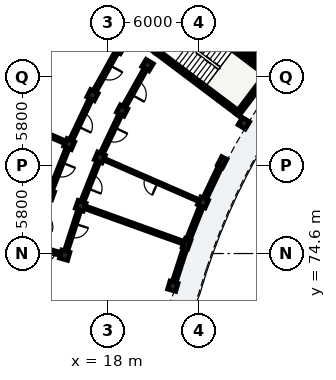
"""IFC4 building model, lengths in metres.
Left out: names, types, materials, properties, quantities, classifications, styles, units other than length and angle.
Written with IfcOpenShell. Run it as: python <this file> out.ifc"""

import sys

from ifc_helpers import new_model, si_unit, direction, frame, frame_2d, origin, origin_2d, place, context, subcontext, project, spatial, rectangle, extrude, element, fill, save


model = new_model("IFC4")
c1 = context("Model", 3, precision=1e-05, world=origin(), true_north=direction((0.0, 1.0)))
c2 = subcontext(c1, "Body", "Model", "MODEL_VIEW")
j1 = project(units=[si_unit("LENGTHUNIT", "METRE"), si_unit("PLANEANGLEUNIT", "RADIAN")], contexts=[c1])
p1 = place(None, origin())
s1 = spatial("IfcSite", under=j1, at=p1, CompositionType="ELEMENT")
p2 = place(p1, origin())
s2 = spatial("IfcBuilding", under=s1, at=p2, CompositionType="ELEMENT")
p3 = place(p2, frame((0.0, 0.0, 22.28)))
s3 = spatial("IfcBuildingStorey", under=s2, at=p3, CompositionType="ELEMENT", Elevation=22.28)
p4 = place(p3, frame((21.199, 87.897, 0.0), z_axis=(0.0, 0.0, 1.0), x_axis=(0.798639633744, -0.601809550782, 0.0)))
e1 = element("IfcWall", 1, at=p4, inside=s3, PredefinedType="SHEAR", context=c2, shape_type="SweptSolid", body=[
    extrude(rectangle(XDim=6.6, YDim=0.28, at=frame_2d((3.3, 0.0))), origin(), (0.0, 0.0, 1.0), 3.11),
])
for number, where, z_axis, x_axis in (
    (2, (26.497, 83.729, 0.0), (0.0, 0.0, 1.0), (0.602, 0.799, 0.0)),
    (3, (21.003, 87.87, 0.0), (0.0, 0.0, 1.0), (0.602, 0.799, 0.0)),
):
    element("IfcWall", number, at=place(p3, frame(where, z_axis=z_axis, x_axis=x_axis)), inside=s3, PredefinedType="SHEAR", context=c2, shape_type="SweptSolid", body=[
        extrude(rectangle(XDim=3.48, YDim=0.28, at=frame_2d((1.74, 0.0))), origin(), (0.0, 0.0, 1.0), 3.11),
    ])
p5 = place(p3, frame((23.125, 90.453, 0.0), z_axis=(0.0, 0.0, 1.0), x_axis=(0.798639633744, -0.601809550782, 0.0)))
e4 = element("IfcWall", 4, at=p5, inside=s3, PredefinedType="SHEAR", context=c2, shape_type="SweptSolid", body=[
    extrude(rectangle(XDim=6.6, YDim=0.28, at=frame_2d((3.3, 0.0))), origin(), (0.0, 0.0, 1.0), 3.11),
])
p6 = place(p5, frame((0.22, 0.0, 0.0)))
e5 = element("IfcOpeningElement", 5, at=p6, cuts=e4, PredefinedType="OPENING", context=c2, shape_type="SweptSolid", body=[
    extrude(rectangle(XDim=1.05, YDim=2.15, at=frame_2d((0.525, 1.075))), frame((0.0, 0.15, 0.0), z_axis=(0.0, -1.0, 0.0), x_axis=(1.0, 0.0, 0.0)), (0.0, 0.0, 1.0), 0.3),
])
p7 = place(p3, frame((26.455, 88.476, 0.0), z_axis=(0.0, 0.0, 1.0), x_axis=(0.798608971494, -0.601850239387, 0.0)))
e6 = element("IfcWall", 6, at=p7, inside=s3, PredefinedType="SHEAR", context=c2, shape_type="SweptSolid", body=[
    extrude(rectangle(XDim=2.7, YDim=0.23, at=frame_2d((1.35, 0.0))), origin(), (0.0, 0.0, 1.0), 3.11),
])
for number, where, z_axis, x_axis in (
    (7, (26.943, 83.167, 0.0), (0.0, 0.0, 1.0), (-0.856, 0.517, 0.0)),
    (8, (20.608, 86.991, 0.0), (0.0, 0.0, 1.0), (-0.856, 0.517, 0.0)),
    (9, (18.724, 88.128, 0.0), (0.0, 0.0, 1.0), (-0.856, 0.517, 0.0)),
):
    element("IfcColumn", number, at=place(p3, frame(where, z_axis=z_axis, x_axis=x_axis)), inside=s3, PredefinedType="COLUMN", context=c2, shape_type="SweptSolid", body=[
        extrude(rectangle(XDim=0.55, YDim=0.55, at=origin_2d()), origin(), (0.0, 0.0, 1.0), 3.11),
    ])
p8 = place(p3, frame((25.513, 80.61, 0.0), z_axis=(0.0, 0.0, 1.0), x_axis=(-0.888350277506, 0.459166401705, 0.0)))
e10 = element("IfcColumn", 10, at=p8, inside=s3, PredefinedType="PILASTER", context=c2, shape_type="SweptSolid", body=[
    extrude(rectangle(XDim=0.38, YDim=0.62, at=origin_2d()), origin(), (0.0, 0.0, 1.0), 3.11),
])
for number, where, z_axis, x_axis in (
    (11, (18.939, 84.008, 0.0), (0.0, 0.0, 1.0), (-0.888, 0.459, 0.0)),
    (12, (16.985, 85.018, 0.0), (0.0, 0.0, 1.0), (-0.888, 0.459, 0.0)),
    (13, (24.254, 77.964, 0.0), (0.0, 0.0, 1.0), (-0.917, 0.4, 0.0)),
    (14, (17.47, 80.921, 0.0), (0.0, 0.0, 1.0), (-0.917, 0.4, 0.0)),
    (15, (15.454, 81.801, 0.0), (0.0, 0.0, 1.0), (-0.917, 0.4, 0.0)),
):
    element("IfcColumn", number, at=place(p3, frame(where, z_axis=z_axis, x_axis=x_axis)), inside=s3, PredefinedType="COLUMN", context=c2, shape_type="SweptSolid", body=[
        extrude(rectangle(XDim=0.55, YDim=0.55, at=origin_2d()), origin(), (0.0, 0.0, 1.0), 3.11),
    ])
p9 = place(p3, frame((23.172, 75.241, 0.0), z_axis=(0.0, 0.0, 1.0), x_axis=(-0.941012100316, 0.338372911236, 0.0)))
e16 = element("IfcColumn", 16, at=p9, inside=s3, PredefinedType="PILASTER", context=c2, shape_type="SweptSolid", body=[
    extrude(rectangle(XDim=0.38, YDim=0.62, at=origin_2d()), origin(), (0.0, 0.0, 1.0), 3.11),
])
for number, where, z_axis, x_axis in (
    (17, (16.208, 77.745, 0.0), (0.0, 0.0, 1.0), (-0.941, 0.338, 0.0)),
    (18, (14.138, 78.489, 0.0), (0.0, 0.0, 1.0), (-0.941, 0.338, 0.0)),
    (19, (22.272, 72.452, 0.0), (0.0, 0.0, 1.0), (-0.961, 0.276, 0.0)),
    (20, (15.159, 74.492, 0.0), (0.0, 0.0, 1.0), (-0.961, 0.276, 0.0)),
):
    element("IfcColumn", number, at=place(p3, frame(where, z_axis=z_axis, x_axis=x_axis)), inside=s3, PredefinedType="COLUMN", context=c2, shape_type="SweptSolid", body=[
        extrude(rectangle(XDim=0.55, YDim=0.55, at=origin_2d()), origin(), (0.0, 0.0, 1.0), 3.11),
    ])
p10 = place(p3, frame((25.444, 80.466, 0.0), z_axis=(0.0, 0.0, 1.0), x_axis=(-0.429610836066, -0.903014135844, 0.0)))
e21 = element("IfcWall", 21, at=p10, inside=s3, PredefinedType="SOLIDWALL", context=c2, shape_type="SweptSolid", body=[
    extrude(rectangle(XDim=2.525, YDim=0.245, at=frame_2d((1.263, 0.0))), origin(), (0.0, 0.0, 1.0), 2.355),
])
p11 = place(p10, frame((0.643, 0.0, 0.55)))
e22 = element("IfcOpeningElement", 22, at=p11, cuts=e21, PredefinedType="OPENING", context=c2, shape_type="SweptSolid", body=[
    extrude(rectangle(XDim=1.24, YDim=1.535, at=frame_2d((0.62, 0.768))), frame((0.0, 0.133, 0.0), z_axis=(0.0, -1.0, 0.0), x_axis=(1.0, 0.0, 0.0)), (0.0, 0.0, 1.0), 0.265),
])
p12 = place(p3, frame((24.163, 77.736, 0.0), z_axis=(0.0, 0.0, 1.0), x_axis=(-0.369122600107, -0.92938071106, 0.0)))
e23 = element("IfcWall", 23, at=p12, inside=s3, PredefinedType="SOLIDWALL", context=c2, shape_type="SweptSolid", body=[
    extrude(rectangle(XDim=2.525, YDim=0.245, at=frame_2d((1.263, 0.0))), origin(), (0.0, 0.0, 1.0), 2.355),
])
p13 = place(p12, frame((0.583, 0.0, 0.55)))
e24 = element("IfcOpeningElement", 24, at=p13, cuts=e23, PredefinedType="OPENING", context=c2, shape_type="SweptSolid", body=[
    extrude(rectangle(XDim=1.36, YDim=1.61, at=frame_2d((0.68, 0.805))), frame((0.0, 0.133, 0.0), z_axis=(0.0, -1.0, 0.0), x_axis=(1.0, 0.0, 0.0)), (0.0, 0.0, 1.0), 0.265),
])
p14 = place(p3, frame((23.123, 75.088, 0.0), z_axis=(0.0, 0.0, 1.0), x_axis=(-0.30716379336, -0.951656662903, 0.0)))
e25 = element("IfcWall", 25, at=p14, inside=s3, PredefinedType="SOLIDWALL", context=c2, shape_type="SweptSolid", body=[
    extrude(rectangle(XDim=2.525, YDim=0.245, at=frame_2d((1.263, 0.0))), origin(), (0.0, 0.0, 1.0), 2.355),
])
p15 = place(p14, frame((0.523, 0.0, 0.55)))
e26 = element("IfcOpeningElement", 26, at=p15, cuts=e25, PredefinedType="OPENING", context=c2, shape_type="SweptSolid", body=[
    extrude(rectangle(XDim=1.48, YDim=1.46, at=frame_2d((0.74, 0.73))), frame((0.0, 0.133, 0.0), z_axis=(0.0, -1.0, 0.0), x_axis=(1.0, 0.0, 0.0)), (0.0, 0.0, 1.0), 0.265),
])
p16 = place(p3, frame((18.553, 87.822, 0.0), z_axis=(0.0, 0.0, 1.0), x_axis=(-0.488211211273, -0.872725508501, 0.0)))
e27 = element("IfcWall", 27, at=p16, inside=s3, PredefinedType="PARTITIONING", context=c2, shape_type="SweptSolid", body=[
    extrude(rectangle(XDim=2.863, YDim=0.205, at=frame_2d((1.431, 0.0))), origin(), (0.0, 0.0, 1.0), 2.37),
])
p17 = place(p16, frame((0.937, 0.0, 0.0)))
e28 = element("IfcOpeningElement", 28, at=p17, cuts=e27, PredefinedType="OPENING", context=c2, shape_type="SweptSolid", body=[
    extrude(rectangle(XDim=0.99, YDim=2.16, at=frame_2d((0.495, 1.08))), frame((0.0, 0.113, 0.0), z_axis=(0.0, -1.0, 0.0), x_axis=(1.0, 0.0, 0.0)), (0.0, 0.0, 1.0), 0.225),
])
p18 = place(p3, frame((20.437, 86.685, 0.0), z_axis=(0.0, 0.0, 1.0), x_axis=(-0.48819576874, -0.872734147025, 0.0)))
e29 = element("IfcWall", 29, at=p18, inside=s3, PredefinedType="PARTITIONING", context=c2, shape_type="SweptSolid", body=[
    extrude(rectangle(XDim=2.718, YDim=0.205, at=frame_2d((1.359, 0.0))), origin(), (0.0, 0.0, 1.0), 2.37),
])
p19 = place(p18, frame((0.864, 0.0, 0.0)))
e30 = element("IfcOpeningElement", 30, at=p19, cuts=e29, PredefinedType="OPENING", context=c2, shape_type="SweptSolid", body=[
    extrude(rectangle(XDim=0.99, YDim=2.16, at=frame_2d((0.495, 1.08))), frame((0.0, 0.113, 0.0), z_axis=(0.0, -1.0, 0.0), x_axis=(1.0, 0.0, 0.0)), (0.0, 0.0, 1.0), 0.225),
])
p20 = place(p3, frame((16.834, 84.702, 0.0), z_axis=(0.0, 0.0, 1.0), x_axis=(-0.429595933416, -0.90302122566, 0.0)))
e31 = element("IfcWall", 31, at=p20, inside=s3, PredefinedType="PARTITIONING", context=c2, shape_type="SweptSolid", body=[
    extrude(rectangle(XDim=2.863, YDim=0.205, at=frame_2d((1.432, 0.0))), origin(), (0.0, 0.0, 1.0), 2.37),
])
p21 = place(p20, frame((0.947, 0.0, 0.0)))
e32 = element("IfcOpeningElement", 32, at=p21, cuts=e31, PredefinedType="OPENING", context=c2, shape_type="SweptSolid", body=[
    extrude(rectangle(XDim=0.97, YDim=2.15, at=frame_2d((0.485, 1.075))), frame((0.0, 0.113, 0.0), z_axis=(0.0, -1.0, 0.0), x_axis=(1.0, 0.0, 0.0)), (0.0, 0.0, 1.0), 0.225),
])
p22 = place(p3, frame((18.789, 83.692, 0.0), z_axis=(0.0, 0.0, 1.0), x_axis=(-0.429630211913, -0.90300491749, 0.0)))
e33 = element("IfcWall", 33, at=p22, inside=s3, PredefinedType="PARTITIONING", context=c2, shape_type="SweptSolid", body=[
    extrude(rectangle(XDim=2.718, YDim=0.205, at=frame_2d((1.359, 0.0))), origin(), (0.0, 0.0, 1.0), 2.37),
])
p23 = place(p22, frame((0.874, 0.0, 0.0)))
e34 = element("IfcOpeningElement", 34, at=p23, cuts=e33, PredefinedType="OPENING", context=c2, shape_type="SweptSolid", body=[
    extrude(rectangle(XDim=0.97, YDim=2.15, at=frame_2d((0.485, 1.075))), frame((0.0, 0.113, 0.0), z_axis=(0.0, -1.0, 0.0), x_axis=(1.0, 0.0, 0.0)), (0.0, 0.0, 1.0), 0.225),
])
p24 = place(p3, frame((15.087, 81.96, 0.0), z_axis=(0.0, 0.0, 1.0), x_axis=(-0.916663273961, 0.39966040856, 0.0)))
e35 = element("IfcWall", 35, at=p24, inside=s3, PredefinedType="PARTITIONING", context=c2, shape_type="SweptSolid", body=[
    extrude(rectangle(XDim=4.7, YDim=0.185, at=frame_2d((2.35, 0.0))), origin(), (0.0, 0.0, 1.0), 2.37),
])
p25 = place(p3, frame((23.887, 78.124, 0.0), z_axis=(0.0, 0.0, 1.0), x_axis=(-0.916668515796, 0.399648385645, 0.0)))
e36 = element("IfcWall", 36, at=p25, inside=s3, PredefinedType="PARTITIONING", context=c2, shape_type="SweptSolid", body=[
    extrude(rectangle(XDim=6.6, YDim=0.125, at=frame_2d((3.3, 0.0))), origin(), (0.0, 0.0, 1.0), 2.37),
])
p26 = place(p25, frame((2.855, 0.0, 0.0)))
e37 = element("IfcOpeningElement", 37, at=p26, cuts=e36, PredefinedType="OPENING", context=c2, shape_type="SweptSolid", body=[
    extrude(rectangle(XDim=0.89, YDim=2.1, at=frame_2d((0.445, 1.05))), frame((0.0, 0.073, 0.0), z_axis=(0.0, -1.0, 0.0), x_axis=(1.0, 0.0, 0.0)), (0.0, 0.0, 1.0), 0.145),
])
p27 = place(p3, frame((15.325, 81.475, 0.0), z_axis=(0.0, 0.0, 1.0), x_axis=(-0.369213832442, -0.929344471083, 0.0)))
e38 = element("IfcWall", 38, at=p27, inside=s3, PredefinedType="PARTITIONING", context=c2, shape_type="SweptSolid", body=[
    extrude(rectangle(XDim=2.863, YDim=0.205, at=frame_2d((1.432, 0.0))), origin(), (0.0, 0.0, 1.0), 2.37),
])
p28 = place(p27, frame((0.957, 0.0, 0.0)))
e39 = element("IfcOpeningElement", 39, at=p28, cuts=e38, PredefinedType="OPENING", context=c2, shape_type="SweptSolid", body=[
    extrude(rectangle(XDim=0.95, YDim=2.13, at=frame_2d((0.475, 1.065))), frame((0.0, 0.113, 0.0), z_axis=(0.0, -1.0, 0.0), x_axis=(1.0, 0.0, 0.0)), (0.0, 0.0, 1.0), 0.225),
])
p29 = place(p3, frame((17.341, 80.596, 0.0), z_axis=(0.0, 0.0, 1.0), x_axis=(-0.369237170461, -0.929335198919, 0.0)))
e40 = element("IfcWall", 40, at=p29, inside=s3, PredefinedType="PARTITIONING", context=c2, shape_type="SweptSolid", body=[
    extrude(rectangle(XDim=2.718, YDim=0.205, at=frame_2d((1.359, 0.0))), origin(), (0.0, 0.0, 1.0), 2.37),
])
p30 = place(p29, frame((0.884, 0.0, 0.0)))
e41 = element("IfcOpeningElement", 41, at=p30, cuts=e40, PredefinedType="OPENING", context=c2, shape_type="SweptSolid", body=[
    extrude(rectangle(XDim=0.95, YDim=2.13, at=frame_2d((0.475, 1.065))), frame((0.0, 0.113, 0.0), z_axis=(0.0, -1.0, 0.0), x_axis=(1.0, 0.0, 0.0)), (0.0, 0.0, 1.0), 0.225),
])
p31 = place(p3, frame((22.796, 75.376, 0.0), z_axis=(0.0, 0.0, 1.0), x_axis=(-0.941005714099, 0.338390670725, 0.0)))
e42 = element("IfcWall", 42, at=p31, inside=s3, PredefinedType="PARTITIONING", context=c2, shape_type="SweptSolid", body=[
    extrude(rectangle(XDim=6.6, YDim=0.185, at=frame_2d((3.3, 0.0))), origin(), (0.0, 0.0, 1.0), 2.37),
])
p32 = place(p3, frame((16.101, 77.412, 0.0), z_axis=(0.0, 0.0, 1.0), x_axis=(-0.307186478934, -0.95164934044, 0.0)))
e43 = element("IfcWall", 43, at=p32, inside=s3, PredefinedType="PARTITIONING", context=c2, shape_type="SweptSolid", body=[
    extrude(rectangle(XDim=2.718, YDim=0.205, at=frame_2d((1.359, 0.0))), origin(), (0.0, 0.0, 1.0), 2.37),
])
p33 = place(p32, frame((0.894, 0.0, 0.0)))
e44 = element("IfcOpeningElement", 44, at=p33, cuts=e43, PredefinedType="OPENING", context=c2, shape_type="SweptSolid", body=[
    extrude(rectangle(XDim=0.93, YDim=2.12, at=frame_2d((0.465, 1.06))), frame((0.0, 0.113, 0.0), z_axis=(0.0, -1.0, 0.0), x_axis=(1.0, 0.0, 0.0)), (0.0, 0.0, 1.0), 0.225),
])
p34 = place(p3, frame((15.111, 74.506, 0.0), z_axis=(0.0, 0.0, 1.0), x_axis=(-0.961264701934, 0.275626872449, 0.0)))
e45 = element("IfcWall", 45, at=p34, inside=s3, PredefinedType="PARTITIONING", context=c2, shape_type="SweptSolid", body=[
    extrude(rectangle(XDim=2.1, YDim=0.205, at=frame_2d((1.05, 0.0))), origin(), (0.0, 0.0, 1.0), 2.37),
])
p35 = place(p34, frame((0.57, 0.0, 0.0)))
e46 = element("IfcOpeningElement", 46, at=p35, cuts=e45, PredefinedType="OPENING", context=c2, shape_type="SweptSolid", body=[
    extrude(rectangle(XDim=0.95, YDim=2.13, at=frame_2d((0.475, 1.065))), frame((0.0, 0.113, 0.0), z_axis=(0.0, -1.0, 0.0), x_axis=(1.0, 0.0, 0.0)), (0.0, 0.0, 1.0), 0.225),
])
p36 = place(p11, origin())
e47 = element("IfcWindow", 47, at=p36, inside=s3, PartitioningType="SINGLE_PANEL", PredefinedType="WINDOW", context=c2, shape_type="SweptSolid", body=[
    extrude(rectangle(XDim=1.24, YDim=1.535, at=frame_2d((0.62, 0.768))), frame((0.0, 0.03, 0.0), z_axis=(0.0, -1.0, 0.0), x_axis=(1.0, 0.0, 0.0)), (0.0, 0.0, 1.0), 0.06),
])
fill(e22, e47)
p37 = place(p13, origin())
e48 = element("IfcWindow", 48, at=p37, inside=s3, PartitioningType="SINGLE_PANEL", PredefinedType="WINDOW", context=c2, shape_type="SweptSolid", body=[
    extrude(rectangle(XDim=1.36, YDim=1.61, at=frame_2d((0.68, 0.805))), frame((0.0, 0.03, 0.0), z_axis=(0.0, -1.0, 0.0), x_axis=(1.0, 0.0, 0.0)), (0.0, 0.0, 1.0), 0.06),
])
fill(e24, e48)
p38 = place(p15, origin())
e49 = element("IfcWindow", 49, at=p38, inside=s3, PartitioningType="SINGLE_PANEL", PredefinedType="WINDOW", context=c2, shape_type="SweptSolid", body=[
    extrude(rectangle(XDim=1.48, YDim=1.46, at=frame_2d((0.74, 0.73))), frame((0.0, 0.03, 0.0), z_axis=(0.0, -1.0, 0.0), x_axis=(1.0, 0.0, 0.0)), (0.0, 0.0, 1.0), 0.06),
])
fill(e26, e49)
p39 = place(p17, origin())
e50 = element("IfcDoor", 50, at=p39, inside=s3, OperationType="SINGLE_SWING_LEFT", PredefinedType="DOOR", context=c2, shape_type="SweptSolid", body=[
    extrude(rectangle(XDim=0.99, YDim=2.16, at=frame_2d((0.495, 1.08))), frame((0.0, 0.025, 0.0), z_axis=(0.0, -1.0, 0.0), x_axis=(1.0, 0.0, 0.0)), (0.0, 0.0, 1.0), 0.05),
])
fill(e28, e50)
p40 = place(p19, origin())
e51 = element("IfcDoor", 51, at=p40, inside=s3, OperationType="SINGLE_SWING_RIGHT", PredefinedType="DOOR", context=c2, shape_type="SweptSolid", body=[
    extrude(rectangle(XDim=0.99, YDim=2.16, at=frame_2d((0.495, 1.08))), frame((0.0, 0.025, 0.0), z_axis=(0.0, -1.0, 0.0), x_axis=(1.0, 0.0, 0.0)), (0.0, 0.0, 1.0), 0.05),
])
fill(e30, e51)
p41 = place(p21, origin())
e52 = element("IfcDoor", 52, at=p41, inside=s3, OperationType="SINGLE_SWING_RIGHT", PredefinedType="DOOR", context=c2, shape_type="SweptSolid", body=[
    extrude(rectangle(XDim=0.97, YDim=2.15, at=frame_2d((0.485, 1.075))), frame((0.0, 0.025, 0.0), z_axis=(0.0, -1.0, 0.0), x_axis=(1.0, 0.0, 0.0)), (0.0, 0.0, 1.0), 0.05),
])
fill(e32, e52)
p42 = place(p23, origin())
e53 = element("IfcDoor", 53, at=p42, inside=s3, OperationType="SINGLE_SWING_LEFT", PredefinedType="DOOR", context=c2, shape_type="SweptSolid", body=[
    extrude(rectangle(XDim=0.97, YDim=2.15, at=frame_2d((0.485, 1.075))), frame((0.0, 0.025, 0.0), z_axis=(0.0, -1.0, 0.0), x_axis=(1.0, 0.0, 0.0)), (0.0, 0.0, 1.0), 0.05),
])
fill(e34, e53)
p43 = place(p26, origin())
e54 = element("IfcDoor", 54, at=p43, inside=s3, OperationType="SINGLE_SWING_LEFT", PredefinedType="DOOR", context=c2, shape_type="SweptSolid", body=[
    extrude(rectangle(XDim=0.89, YDim=2.1, at=frame_2d((0.445, 1.05))), frame((0.0, 0.025, 0.0), z_axis=(0.0, -1.0, 0.0), x_axis=(1.0, 0.0, 0.0)), (0.0, 0.0, 1.0), 0.05),
])
fill(e37, e54)
p44 = place(p28, origin())
e55 = element("IfcDoor", 55, at=p44, inside=s3, OperationType="SINGLE_SWING_LEFT", PredefinedType="DOOR", context=c2, shape_type="SweptSolid", body=[
    extrude(rectangle(XDim=0.95, YDim=2.13, at=frame_2d((0.475, 1.065))), frame((0.0, 0.025, 0.0), z_axis=(0.0, -1.0, 0.0), x_axis=(1.0, 0.0, 0.0)), (0.0, 0.0, 1.0), 0.05),
])
fill(e39, e55)
p45 = place(p30, origin())
e56 = element("IfcDoor", 56, at=p45, inside=s3, OperationType="SINGLE_SWING_RIGHT", PredefinedType="DOOR", context=c2, shape_type="SweptSolid", body=[
    extrude(rectangle(XDim=0.95, YDim=2.13, at=frame_2d((0.475, 1.065))), frame((0.0, 0.025, 0.0), z_axis=(0.0, -1.0, 0.0), x_axis=(1.0, 0.0, 0.0)), (0.0, 0.0, 1.0), 0.05),
])
fill(e41, e56)
p46 = place(p33, origin())
e57 = element("IfcDoor", 57, at=p46, inside=s3, OperationType="SINGLE_SWING_LEFT", PredefinedType="DOOR", context=c2, shape_type="SweptSolid", body=[
    extrude(rectangle(XDim=0.93, YDim=2.12, at=frame_2d((0.465, 1.06))), frame((0.0, 0.025, 0.0), z_axis=(0.0, -1.0, 0.0), x_axis=(1.0, 0.0, 0.0)), (0.0, 0.0, 1.0), 0.05),
])
fill(e44, e57)
p47 = place(p35, origin())
e58 = element("IfcDoor", 58, at=p47, inside=s3, OperationType="SINGLE_SWING_RIGHT", PredefinedType="DOOR", context=c2, shape_type="SweptSolid", body=[
    extrude(rectangle(XDim=0.95, YDim=2.13, at=frame_2d((0.475, 1.065))), frame((0.0, 0.025, 0.0), z_axis=(0.0, -1.0, 0.0), x_axis=(1.0, 0.0, 0.0)), (0.0, 0.0, 1.0), 0.05),
])
fill(e46, e58)
save(model, sys.argv[1])
